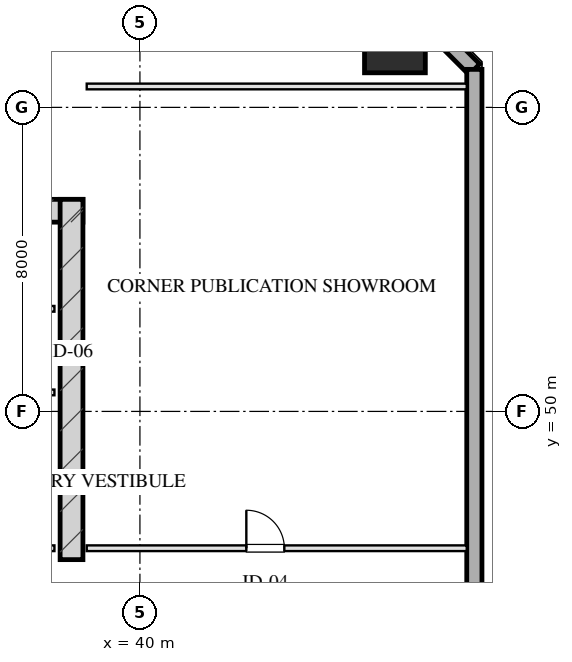
"""IFC4 building model, lengths in metres.
Left out: names, types, materials, properties, quantities, classifications, styles, units other than length and angle.
Written with IfcOpenShell. Run it as: python <this file> out.ifc"""

import sys

from ifc_helpers import new_model, si_unit, direction, frame, frame_2d, origin, origin_2d, place, context, subcontext, project, spatial, rectangle, hollow_rectangle, extrude, element, fill, save


model = new_model("IFC4")
c1 = context("Model", 3, precision=1e-05, world=origin(), true_north=direction((0.0, 1.0)))
c2 = subcontext(c1, "Body", "Model", "MODEL_VIEW")
j1 = project(units=[si_unit("LENGTHUNIT", "METRE"), si_unit("PLANEANGLEUNIT", "RADIAN")], contexts=[c1])
p1 = place(None, origin())
s1 = spatial("IfcSite", under=j1, at=p1, CompositionType="ELEMENT")
p2 = place(p1, origin())
s2 = spatial("IfcBuilding", under=s1, at=p2, CompositionType="ELEMENT")
p3 = place(p2, frame((0.0, 0.0, 117.3)))
s3 = spatial("IfcBuildingStorey", under=s2, at=p3, CompositionType="ELEMENT", Elevation=117.3)
p4 = place(p3, frame((21.5, 55.28, 0.0), z_axis=(0.0, 0.0, 1.0), x_axis=(1.0, 0.0, 0.0)))
e1 = element("IfcWall", 1, at=p4, inside=s3, PredefinedType="SHEAR", context=c2, shape_type="SweptSolid", body=[
    extrude(rectangle(XDim=17.0, YDim=0.6, at=frame_2d((8.5, 0.0))), origin(), (0.0, 0.0, 1.0), 3.45),
])
p5 = place(p3, frame((38.2, 46.1, 0.0), z_axis=(0.0, 0.0, 1.0), x_axis=(0.0, 1.0, 0.0)))
e2 = element("IfcWall", 2, at=p5, inside=s3, PredefinedType="SHEAR", context=c2, shape_type="SweptSolid", body=[
    extrude(rectangle(XDim=9.48, YDim=0.6, at=frame_2d((4.74, 0.0))), origin(), (0.0, 0.0, 1.0), 3.45),
])
p6 = place(p3, frame((46.71, 59.71, 0.0), z_axis=(0.0, 0.0, 1.0), x_axis=(1.0, 0.0, 0.0)))
e3 = element("IfcColumn", 3, at=p6, inside=s3, PredefinedType="COLUMN", context=c2, shape_type="SweptSolid", body=[
    extrude(hollow_rectangle(XDim=1.6, YDim=1.6, WallThickness=0.055, at=origin_2d()), origin(), (0.0, 0.0, 1.0), 3.451),
])
p7 = place(p3, frame((46.0, 61.8, 0.0), z_axis=(0.0, 0.0, 1.0), x_axis=(0.707106781187, -0.707106781187, 0.0)))
e4 = element("IfcWall", 4, at=p7, inside=s3, PredefinedType="SOLIDWALL", context=c2, shape_type="SweptSolid", body=[
    extrude(rectangle(XDim=3.96, YDim=0.4, at=frame_2d((1.98, 0.0))), origin(), (0.0, 0.0, 1.0), 2.61),
])
p8 = place(p3, frame((48.8, 59.0, 0.0), z_axis=(0.0, 0.0, 1.0), x_axis=(0.0, -1.0, 0.0)))
e5 = element("IfcWall", 5, at=p8, inside=s3, PredefinedType="SOLIDWALL", context=c2, shape_type="SweptSolid", body=[
    extrude(rectangle(XDim=50.0, YDim=0.4, at=frame_2d((25.0, 0.0))), origin(), (0.0, 0.0, 1.0), 2.61),
])
p9 = place(p8, frame((21.2, 0.0, 0.75)))
e6 = element("IfcOpeningElement", 6, at=p9, cuts=e5, PredefinedType="OPENING", context=c2, shape_type="SweptSolid", body=[
    extrude(rectangle(XDim=2.4, YDim=1.46, at=frame_2d((1.2, 0.73))), frame((0.0, 0.21, 0.0), z_axis=(0.0, -1.0, 0.0), x_axis=(1.0, 0.0, 0.0)), (0.0, 0.0, 1.0), 0.42),
])
p10 = place(p3, frame((33.95, 46.4, 0.0), z_axis=(0.0, 0.0, 1.0), x_axis=(1.0, 0.0, 0.0)))
e7 = element("IfcWall", 7, at=p10, inside=s3, PredefinedType="PARTITIONING", context=c2, shape_type="SweptSolid", body=[
    extrude(rectangle(XDim=3.8, YDim=0.15, at=frame_2d((1.9, 0.0))), origin(), (0.0, 0.0, 1.0), 3.175),
])
p11 = place(p10, frame((0.22, 0.0, 0.0)))
e8 = element("IfcOpeningElement", 8, at=p11, cuts=e7, PredefinedType="OPENING", context=c2, shape_type="SweptSolid", body=[
    extrude(rectangle(XDim=0.95, YDim=2.05, at=frame_2d((0.475, 1.025))), frame((0.0, 0.085, 0.0), z_axis=(0.0, -1.0, 0.0), x_axis=(1.0, 0.0, 0.0)), (0.0, 0.0, 1.0), 0.17),
])
for number, where, z_axis, x_axis in (
    (9, (35.45, 50.5, 0.0), (0.0, 0.0, 1.0), (1.0, 0.0, 0.0)),
    (10, (35.45, 52.7, 0.0), (0.0, 0.0, 1.0), (1.0, 0.0, 0.0)),
):
    element("IfcWall", number, at=place(p3, frame(where, z_axis=z_axis, x_axis=x_axis)), inside=s3, PredefinedType="PARTITIONING", context=c2, shape_type="SweptSolid", body=[
        extrude(rectangle(XDim=2.3, YDim=0.15, at=frame_2d((1.15, 0.0))), origin(), (0.0, 0.0, 1.0), 3.175),
    ])
p12 = place(p3, frame((38.6, 58.55, 0.0), z_axis=(0.0, 0.0, 1.0), x_axis=(1.0, 0.0, 0.0)))
e11 = element("IfcWall", 11, at=p12, inside=s3, PredefinedType="PARTITIONING", context=c2, shape_type="SweptSolid", body=[
    extrude(rectangle(XDim=10.0, YDim=0.15, at=frame_2d((5.0, 0.0))), origin(), (0.0, 0.0, 1.0), 3.175),
])
p13 = place(p3, frame((38.6, 46.4, 0.0), z_axis=(0.0, 0.0, 1.0), x_axis=(1.0, 0.0, 0.0)))
e12 = element("IfcWall", 12, at=p13, inside=s3, PredefinedType="PARTITIONING", context=c2, shape_type="SweptSolid", body=[
    extrude(rectangle(XDim=10.0, YDim=0.15, at=frame_2d((5.0, 0.0))), origin(), (0.0, 0.0, 1.0), 3.175),
])
p14 = place(p13, frame((4.2, 0.0, 0.0)))
e13 = element("IfcOpeningElement", 13, at=p14, cuts=e12, PredefinedType="OPENING", context=c2, shape_type="SweptSolid", body=[
    extrude(rectangle(XDim=1.0, YDim=2.05, at=frame_2d((0.5, 1.025))), frame((0.0, 0.085, 0.0), z_axis=(0.0, -1.0, 0.0), x_axis=(1.0, 0.0, 0.0)), (0.0, 0.0, 1.0), 0.17),
])
p15 = place(p14, origin())
e14 = element("IfcDoor", 14, at=p15, inside=s3, OperationType="SINGLE_SWING_LEFT", PredefinedType="DOOR", context=c2, shape_type="SweptSolid", body=[
    extrude(rectangle(XDim=1.0, YDim=2.05, at=frame_2d((0.5, 1.025))), frame((0.0, 0.025, 0.0), z_axis=(0.0, -1.0, 0.0), x_axis=(1.0, 0.0, 0.0)), (0.0, 0.0, 1.0), 0.05),
])
fill(e13, e14)
save(model, sys.argv[1])
